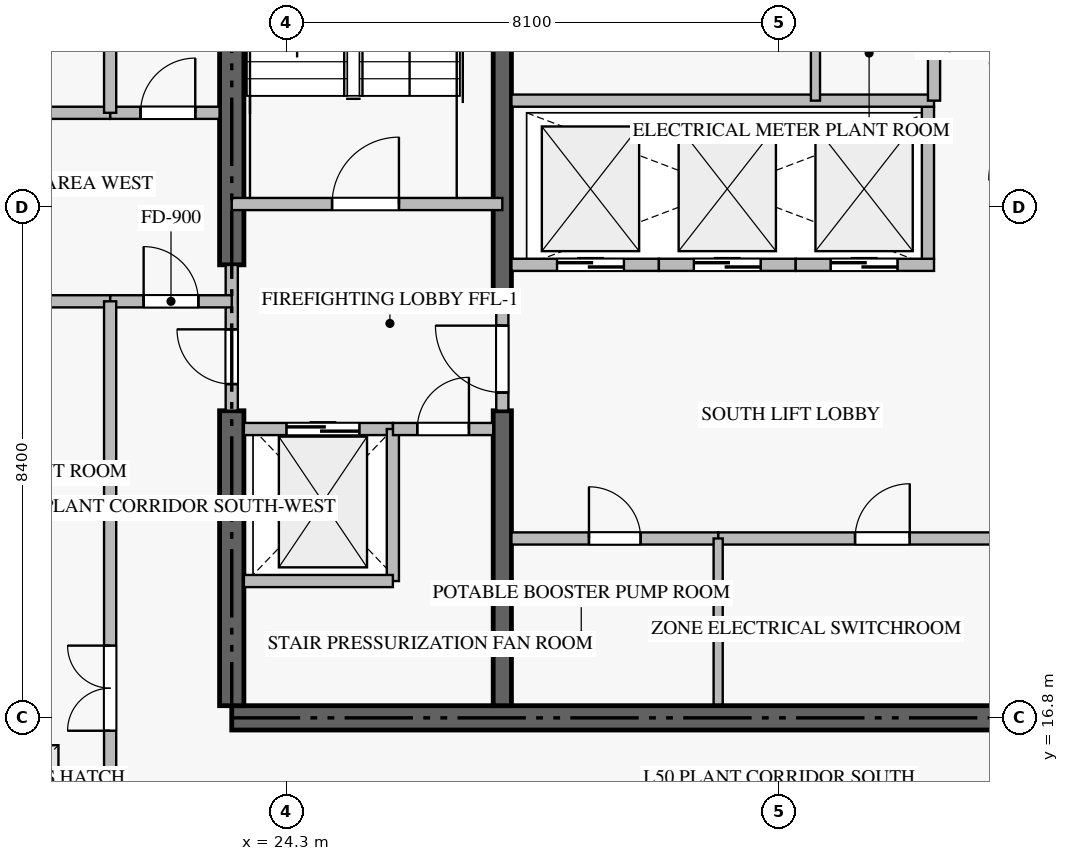
"""IFC4 building model, lengths in metres.
Left out: names, types, materials, properties, quantities, classifications, styles, units other than length and angle.
Written with IfcOpenShell. Run it as: python <this file> out.ifc"""

import sys

from ifc_helpers import new_model, si_unit, direction, frame, frame_2d, origin, origin_2d, place, context, subcontext, project, spatial, rectangle, extrude, source, transform, mapped, element, fill, save


model = new_model("IFC4")
c1 = context("Model", 3, precision=1e-05, world=origin(), true_north=direction((0.0, 1.0)))
c2 = subcontext(c1, "Body", "Model", "MODEL_VIEW")
j1 = project(units=[si_unit("LENGTHUNIT", "METRE"), si_unit("PLANEANGLEUNIT", "RADIAN")], contexts=[c1])
p1 = place(None, origin())
s1 = spatial("IfcSite", under=j1, at=p1, CompositionType="ELEMENT")
p2 = place(p1, origin())
s2 = spatial("IfcBuilding", under=s1, at=p2, CompositionType="ELEMENT")
p3 = place(p2, frame((0.0, 0.0, 198.9)))
s3 = spatial("IfcBuildingStorey", under=s2, at=p3, CompositionType="ELEMENT", Elevation=198.9)
p4 = place(p3, frame((23.4, 16.8, -0.44), z_axis=(0.0, 0.0, 1.0), x_axis=(1.0, 0.0, 0.0)))
e1 = element("IfcWall", 1, at=p4, inside=s3, PredefinedType="SHEAR", context=c2, shape_type="SweptSolid", body=[
    extrude(rectangle(XDim=18.0, YDim=0.4, at=frame_2d((9.0, 0.0))), origin(), (0.0, 0.0, 1.0), 6.078),
])
p5 = place(p3, frame((23.4, 17.0, -0.44), z_axis=(0.0, 0.0, 1.0), x_axis=(0.0, 1.0, 0.0)))
e2 = element("IfcWall", 2, at=p5, inside=s3, PredefinedType="SHEAR", context=c2, shape_type="SweptSolid", body=[
    extrude(rectangle(XDim=4.85, YDim=0.4, at=frame_2d((2.425, 0.0))), origin(), (0.0, 0.0, 1.0), 6.078),
])
p6 = place(p3, frame((23.4, 24.25, -0.44), z_axis=(0.0, 0.0, 1.0), x_axis=(0.0, 1.0, 0.0)))
e3 = element("IfcWall", 3, at=p6, inside=s3, PredefinedType="SHEAR", context=c2, shape_type="SweptSolid", body=[
    extrude(rectangle(XDim=9.15, YDim=0.4, at=frame_2d((4.575, 0.0))), origin(), (0.0, 0.0, 1.0), 6.078),
])
p7 = place(p3, frame((27.85, 17.0, -0.44), z_axis=(0.0, 0.0, 1.0), x_axis=(0.0, 1.0, 0.0)))
e4 = element("IfcWall", 4, at=p7, inside=s3, PredefinedType="SHEAR", context=c2, shape_type="SweptSolid", body=[
    extrude(rectangle(XDim=4.85, YDim=0.3, at=frame_2d((2.425, 0.0))), origin(), (0.0, 0.0, 1.0), 6.078),
])
p8 = place(p3, frame((27.85, 23.55, -0.44), z_axis=(0.0, 0.0, 1.0), x_axis=(0.0, 1.0, 0.0)))
e5 = element("IfcWall", 5, at=p8, inside=s3, PredefinedType="SHEAR", context=c2, shape_type="SweptSolid", body=[
    extrude(rectangle(XDim=9.85, YDim=0.3, at=frame_2d((4.925, 0.0))), origin(), (0.0, 0.0, 1.0), 6.078),
])
p9 = place(p3, frame((23.4, 25.25, 0.0), z_axis=(0.0, 0.0, 1.0), x_axis=(1.0, 0.0, 0.0)))
e6 = element("IfcWall", 6, at=p9, inside=s3, PredefinedType="STANDARD", context=c2, shape_type="SweptSolid", body=[
    extrude(rectangle(XDim=4.45, YDim=0.2, at=frame_2d((2.225, 0.0))), origin(), (0.0, 0.0, 1.0), 5.64),
])
p10 = place(p9, frame((1.65, 0.0, 0.0)))
e7 = element("IfcOpeningElement", 7, at=p10, cuts=e6, PredefinedType="OPENING", context=c2, shape_type="SweptSolid", body=[
    extrude(rectangle(XDim=1.1, YDim=2.15, at=frame_2d((0.55, 1.075))), frame((0.0, 0.11, 0.0), z_axis=(0.0, -1.0, 0.0), x_axis=(1.0, 0.0, 0.0)), (0.0, 0.0, 1.0), 0.22),
])
p11 = place(p3, frame((23.6, 21.55, 0.0), z_axis=(0.0, 0.0, 1.0), x_axis=(1.0, 0.0, 0.0)))
e8 = element("IfcWall", 8, at=p11, inside=s3, PredefinedType="STANDARD", context=c2, shape_type="SweptSolid", body=[
    extrude(rectangle(XDim=2.45, YDim=0.2, at=frame_2d((1.225, 0.0))), origin(), (0.0, 0.0, 1.0), 5.64),
])
p12 = place(p11, frame((0.7, 0.0, 0.0)))
e9 = element("IfcOpeningElement", 9, at=p12, cuts=e8, PredefinedType="OPENING", context=c2, shape_type="SweptSolid", body=[
    extrude(rectangle(XDim=1.2, YDim=2.2, at=frame_2d((0.6, 1.1))), frame((0.0, 0.11, 0.0), z_axis=(0.0, -1.0, 0.0), x_axis=(1.0, 0.0, 0.0)), (0.0, 0.0, 1.0), 0.22),
])
p13 = place(p3, frame((28.0, 24.25, 0.0), z_axis=(0.0, 0.0, 1.0), x_axis=(1.0, 0.0, 0.0)))
e10 = element("IfcWall", 10, at=p13, inside=s3, PredefinedType="STANDARD", context=c2, shape_type="SweptSolid", body=[
    extrude(rectangle(XDim=2.425, YDim=0.2, at=frame_2d((1.212, 0.0))), origin(), (0.0, 0.0, 1.0), 5.64),
])
p14 = place(p13, frame((0.75, 0.0, 0.0)))
e11 = element("IfcOpeningElement", 11, at=p14, cuts=e10, PredefinedType="OPENING", context=c2, shape_type="SweptSolid", body=[
    extrude(rectangle(XDim=1.1, YDim=2.2, at=frame_2d((0.55, 1.1))), frame((0.0, 0.11, 0.0), z_axis=(0.0, -1.0, 0.0), x_axis=(1.0, 0.0, 0.0)), (0.0, 0.0, 1.0), 0.22),
])
p15 = place(p3, frame((30.425, 24.25, 0.0), z_axis=(0.0, 0.0, 1.0), x_axis=(1.0, 0.0, 0.0)))
e12 = element("IfcWall", 12, at=p15, inside=s3, PredefinedType="STANDARD", context=c2, shape_type="SweptSolid", body=[
    extrude(rectangle(XDim=2.25, YDim=0.2, at=frame_2d((1.125, 0.0))), origin(), (0.0, 0.0, 1.0), 5.64),
])
p16 = place(p15, frame((0.575, 0.0, 0.0)))
e13 = element("IfcOpeningElement", 13, at=p16, cuts=e12, PredefinedType="OPENING", context=c2, shape_type="SweptSolid", body=[
    extrude(rectangle(XDim=1.1, YDim=2.2, at=frame_2d((0.55, 1.1))), frame((0.0, 0.11, 0.0), z_axis=(0.0, -1.0, 0.0), x_axis=(1.0, 0.0, 0.0)), (0.0, 0.0, 1.0), 0.22),
])
p17 = place(p3, frame((32.675, 24.25, 0.0), z_axis=(0.0, 0.0, 1.0), x_axis=(1.0, 0.0, 0.0)))
e14 = element("IfcWall", 14, at=p17, inside=s3, PredefinedType="STANDARD", context=c2, shape_type="SweptSolid", body=[
    extrude(rectangle(XDim=2.275, YDim=0.2, at=frame_2d((1.137, 0.0))), origin(), (0.0, 0.0, 1.0), 5.64),
])
p18 = place(p17, frame((0.575, 0.0, 0.0)))
e15 = element("IfcOpeningElement", 15, at=p18, cuts=e14, PredefinedType="OPENING", context=c2, shape_type="SweptSolid", body=[
    extrude(rectangle(XDim=1.1, YDim=2.2, at=frame_2d((0.55, 1.1))), frame((0.0, 0.11, 0.0), z_axis=(0.0, -1.0, 0.0), x_axis=(1.0, 0.0, 0.0)), (0.0, 0.0, 1.0), 0.22),
])
for number, where, z_axis, x_axis in (
    (16, (34.85, 24.35, 0.0), (0.0, 0.0, 1.0), (0.0, 1.0, 0.0)),
    (17, (26.05, 19.05, 0.0), (0.0, 0.0, 1.0), (0.0, 1.0, 0.0)),
):
    element("IfcWall", number, at=place(p3, frame(where, z_axis=z_axis, x_axis=x_axis)), inside=s3, PredefinedType="STANDARD", context=c2, shape_type="SweptSolid", body=[
        extrude(rectangle(XDim=2.5, YDim=0.2, at=frame_2d((1.25, 0.0))), origin(), (0.0, 0.0, 1.0), 5.64),
    ])
p19 = place(p3, frame((23.6, 19.05, 0.0), z_axis=(0.0, 0.0, 1.0), x_axis=(1.0, 0.0, 0.0)))
e18 = element("IfcWall", 18, at=p19, inside=s3, PredefinedType="STANDARD", context=c2, shape_type="SweptSolid", body=[
    extrude(rectangle(XDim=2.45, YDim=0.2, at=frame_2d((1.225, 0.0))), origin(), (0.0, 0.0, 1.0), 5.64),
])
p20 = place(p3, frame((26.052, 21.55, 0.0), z_axis=(0.0, 0.0, 1.0), x_axis=(1.0, 0.0, 0.0)))
e19 = element("IfcWall", 19, at=p20, inside=s3, PredefinedType="STANDARD", context=c2, shape_type="SweptSolid", body=[
    extrude(rectangle(XDim=1.648, YDim=0.2, at=frame_2d((0.824, 0.0))), origin(), (0.0, 0.0, 1.0), 5.64),
])
p21 = place(p20, frame((0.399, 0.0, 0.0)))
e20 = element("IfcOpeningElement", 20, at=p21, cuts=e19, PredefinedType="OPENING", context=c2, shape_type="SweptSolid", body=[
    extrude(rectangle(XDim=0.85, YDim=2.1, at=frame_2d((0.425, 1.05))), frame((0.0, 0.11, 0.0), z_axis=(0.0, -1.0, 0.0), x_axis=(1.0, 0.0, 0.0)), (0.0, 0.0, 1.0), 0.22),
])
p22 = place(p3, frame((23.4, 21.852, 0.0), z_axis=(0.0, 0.0, 1.0), x_axis=(0.0, 1.0, 0.0)))
e21 = element("IfcWall", 21, at=p22, inside=s3, PredefinedType="STANDARD", context=c2, shape_type="SweptSolid", body=[
    extrude(rectangle(XDim=2.396, YDim=0.2, at=frame_2d((1.198, 0.0))), origin(), (0.0, 0.0, 1.0), 5.64),
])
p23 = place(p22, frame((0.437, 0.0, 0.0)))
e22 = element("IfcOpeningElement", 22, at=p23, cuts=e21, PredefinedType="OPENING", context=c2, shape_type="SweptSolid", body=[
    extrude(rectangle(XDim=0.9, YDim=2.1, at=frame_2d((0.45, 1.05))), frame((0.0, 0.11, 0.0), z_axis=(0.0, -1.0, 0.0), x_axis=(1.0, 0.0, 0.0)), (0.0, 0.0, 1.0), 0.22),
])
p24 = place(p3, frame((27.85, 21.852, 0.0), z_axis=(0.0, 0.0, 1.0), x_axis=(0.0, 1.0, 0.0)))
e23 = element("IfcWall", 23, at=p24, inside=s3, PredefinedType="STANDARD", context=c2, shape_type="SweptSolid", body=[
    extrude(rectangle(XDim=1.696, YDim=0.2, at=frame_2d((0.848, 0.0))), origin(), (0.0, 0.0, 1.0), 5.64),
])
p25 = place(p24, frame((0.298, 0.0, 0.0)))
e24 = element("IfcOpeningElement", 24, at=p25, cuts=e23, PredefinedType="OPENING", context=c2, shape_type="SweptSolid", body=[
    extrude(rectangle(XDim=1.1, YDim=2.15, at=frame_2d((0.55, 1.075))), frame((0.0, 0.11, 0.0), z_axis=(0.0, -1.0, 0.0), x_axis=(1.0, 0.0, 0.0)), (0.0, 0.0, 1.0), 0.22),
])
p26 = place(p3, frame((28.0, 26.95, 0.0), z_axis=(0.0, 0.0, 1.0), x_axis=(1.0, 0.0, 0.0)))
e25 = element("IfcWall", 25, at=p26, inside=s3, PredefinedType="STANDARD", context=c2, shape_type="SweptSolid", body=[
    extrude(rectangle(XDim=6.95, YDim=0.2, at=frame_2d((3.475, 0.0))), origin(), (0.0, 0.0, 1.0), 5.64),
])
p27 = place(p3, frame((34.95, 26.95, 0.0), z_axis=(0.0, 0.0, 1.0), x_axis=(0.0, 1.0, 0.0)))
e26 = element("IfcWall", 26, at=p27, inside=s3, PredefinedType="STANDARD", context=c2, shape_type="SweptSolid", body=[
    extrude(rectangle(XDim=3.6, YDim=0.2, at=frame_2d((1.8, 0.0))), origin(), (0.0, 0.0, 1.0), 5.64),
])
p28 = place(p27, frame((1.35, 0.0, 0.0)))
e27 = element("IfcOpeningElement", 27, at=p28, cuts=e26, PredefinedType="OPENING", context=c2, shape_type="SweptSolid", body=[
    extrude(rectangle(XDim=0.9, YDim=2.1, at=frame_2d((0.45, 1.05))), frame((0.0, 0.11, 0.0), z_axis=(0.0, -1.0, 0.0), x_axis=(1.0, 0.0, 0.0)), (0.0, 0.0, 1.0), 0.22),
])
p29 = place(p3, frame((33.0, 26.95, 0.0), z_axis=(0.0, 0.0, 1.0), x_axis=(0.0, 1.0, 0.0)))
e28 = element("IfcWall", 28, at=p29, inside=s3, PredefinedType="PARTITIONING", context=c2, shape_type="SweptSolid", body=[
    extrude(rectangle(XDim=3.6, YDim=0.15, at=frame_2d((1.8, 0.0))), origin(), (0.0, 0.0, 1.0), 5.64),
])
p30 = place(p29, frame((1.375, 0.0, 0.0)))
e29 = element("IfcOpeningElement", 29, at=p30, cuts=e28, PredefinedType="OPENING", context=c2, shape_type="SweptSolid", body=[
    extrude(rectangle(XDim=0.85, YDim=2.1, at=frame_2d((0.425, 1.05))), frame((0.0, 0.085, 0.0), z_axis=(0.0, -1.0, 0.0), x_axis=(1.0, 0.0, 0.0)), (0.0, 0.0, 1.0), 0.17),
])
p31 = place(p3, frame((28.0, 19.75, 0.0), z_axis=(0.0, 0.0, 1.0), x_axis=(1.0, 0.0, 0.0)))
e30 = element("IfcWall", 30, at=p31, inside=s3, PredefinedType="STANDARD", context=c2, shape_type="SweptSolid", body=[
    extrude(rectangle(XDim=3.4, YDim=0.2, at=frame_2d((1.7, 0.0))), origin(), (0.0, 0.0, 1.0), 5.64),
])
p32 = place(p31, frame((1.275, 0.0, 0.0)))
e31 = element("IfcOpeningElement", 31, at=p32, cuts=e30, PredefinedType="OPENING", context=c2, shape_type="SweptSolid", body=[
    extrude(rectangle(XDim=0.85, YDim=2.1, at=frame_2d((0.425, 1.05))), frame((0.0, 0.11, 0.0), z_axis=(0.0, -1.0, 0.0), x_axis=(1.0, 0.0, 0.0)), (0.0, 0.0, 1.0), 0.22),
])
p33 = place(p3, frame((31.402, 19.75, 0.0), z_axis=(0.0, 0.0, 1.0), x_axis=(1.0, 0.0, 0.0)))
e32 = element("IfcWall", 32, at=p33, inside=s3, PredefinedType="STANDARD", context=c2, shape_type="SweptSolid", body=[
    extrude(rectangle(XDim=5.398, YDim=0.2, at=frame_2d((2.699, 0.0))), origin(), (0.0, 0.0, 1.0), 5.64),
])
p34 = place(p33, frame((2.249, 0.0, 0.0)))
e33 = element("IfcOpeningElement", 33, at=p34, cuts=e32, PredefinedType="OPENING", context=c2, shape_type="SweptSolid", body=[
    extrude(rectangle(XDim=0.9, YDim=2.1, at=frame_2d((0.45, 1.05))), frame((0.0, 0.11, 0.0), z_axis=(0.0, -1.0, 0.0), x_axis=(1.0, 0.0, 0.0)), (0.0, 0.0, 1.0), 0.22),
])
p35 = place(p3, frame((31.4, 17.02, 0.0), z_axis=(0.0, 0.0, 1.0), x_axis=(0.0, 1.0, 0.0)))
e34 = element("IfcWall", 34, at=p35, inside=s3, PredefinedType="PARTITIONING", context=c2, shape_type="SweptSolid", body=[
    extrude(rectangle(XDim=2.73, YDim=0.15, at=frame_2d((1.365, 0.0))), origin(), (0.0, 0.0, 1.0), 5.64),
])
p36 = place(p3, frame((15.2, 23.65, 0.0), z_axis=(0.0, 0.0, 1.0), x_axis=(1.0, 0.0, 0.0)))
e35 = element("IfcWall", 35, at=p36, inside=s3, PredefinedType="STANDARD", context=c2, shape_type="SweptSolid", body=[
    extrude(rectangle(XDim=6.2, YDim=0.2, at=frame_2d((3.1, 0.0))), origin(), (0.0, 0.0, 1.0), 5.64),
])
p37 = place(p3, frame((21.402, 23.65, 0.0), z_axis=(0.0, 0.0, 1.0), x_axis=(1.0, 0.0, 0.0)))
e36 = element("IfcWall", 36, at=p37, inside=s3, PredefinedType="STANDARD", context=c2, shape_type="SweptSolid", body=[
    extrude(rectangle(XDim=1.998, YDim=0.2, at=frame_2d((0.999, 0.0))), origin(), (0.0, 0.0, 1.0), 5.64),
])
p38 = place(p37, frame((0.549, 0.0, 0.0)))
e37 = element("IfcOpeningElement", 37, at=p38, cuts=e36, PredefinedType="OPENING", context=c2, shape_type="SweptSolid", body=[
    extrude(rectangle(XDim=0.9, YDim=2.1, at=frame_2d((0.45, 1.05))), frame((0.0, 0.11, 0.0), z_axis=(0.0, -1.0, 0.0), x_axis=(1.0, 0.0, 0.0)), (0.0, 0.0, 1.0), 0.22),
])
p39 = place(p3, frame((15.2, 26.75, 0.0), z_axis=(0.0, 0.0, 1.0), x_axis=(1.0, 0.0, 0.0)))
e38 = element("IfcWall", 38, at=p39, inside=s3, PredefinedType="STANDARD", context=c2, shape_type="SweptSolid", body=[
    extrude(rectangle(XDim=6.2, YDim=0.2, at=frame_2d((3.1, 0.0))), origin(), (0.0, 0.0, 1.0), 5.64),
])
p40 = place(p3, frame((21.402, 26.75, 0.0), z_axis=(0.0, 0.0, 1.0), x_axis=(1.0, 0.0, 0.0)))
e39 = element("IfcWall", 39, at=p40, inside=s3, PredefinedType="STANDARD", context=c2, shape_type="SweptSolid", body=[
    extrude(rectangle(XDim=1.798, YDim=0.2, at=frame_2d((0.899, 0.0))), origin(), (0.0, 0.0, 1.0), 5.64),
])
p41 = place(p40, frame((0.498, 0.0, 0.0)))
e40 = element("IfcOpeningElement", 40, at=p41, cuts=e39, PredefinedType="OPENING", context=c2, shape_type="SweptSolid", body=[
    extrude(rectangle(XDim=0.9, YDim=2.1, at=frame_2d((0.45, 1.05))), frame((0.0, 0.11, 0.0), z_axis=(0.0, -1.0, 0.0), x_axis=(1.0, 0.0, 0.0)), (0.0, 0.0, 1.0), 0.22),
])
p42 = place(p3, frame((21.4, 14.8, 0.0), z_axis=(0.0, 0.0, 1.0), x_axis=(0.0, 1.0, 0.0)))
e41 = element("IfcWall", 41, at=p42, inside=s3, PredefinedType="STANDARD", context=c2, shape_type="SweptSolid", body=[
    extrude(rectangle(XDim=8.85, YDim=0.2, at=frame_2d((4.425, 0.0))), origin(), (0.0, 0.0, 1.0), 5.64),
])
p43 = place(p42, frame((1.788, 0.0, 0.0)))
e42 = element("IfcOpeningElement", 42, at=p43, cuts=e41, PredefinedType="OPENING", context=c2, shape_type="SweptSolid", body=[
    extrude(rectangle(XDim=1.4, YDim=2.2, at=frame_2d((0.7, 1.1))), frame((0.0, 0.11, 0.0), z_axis=(0.0, -1.0, 0.0), x_axis=(1.0, 0.0, 0.0)), (0.0, 0.0, 1.0), 0.22),
])
p44 = place(p3, frame((21.4, 26.75, 0.0), z_axis=(0.0, 0.0, 1.0), x_axis=(0.0, 1.0, 0.0)))
e43 = element("IfcWall", 43, at=p44, inside=s3, PredefinedType="STANDARD", context=c2, shape_type="SweptSolid", body=[
    extrude(rectangle(XDim=8.85, YDim=0.2, at=frame_2d((4.425, 0.0))), origin(), (0.0, 0.0, 1.0), 5.64),
])
p45 = place(p44, frame((5.662, 0.0, 0.0)))
e44 = element("IfcOpeningElement", 44, at=p45, cuts=e43, PredefinedType="OPENING", context=c2, shape_type="SweptSolid", body=[
    extrude(rectangle(XDim=1.4, YDim=2.2, at=frame_2d((0.7, 1.1))), frame((0.0, 0.11, 0.0), z_axis=(0.0, -1.0, 0.0), x_axis=(1.0, 0.0, 0.0)), (0.0, 0.0, 1.0), 0.22),
])
p46 = place(p2, frame((0.0, 0.0, 204.9)))
p47 = place(p46, frame((0.0, 0.0, -0.36)))
p48 = place(p47, frame((20.0, 15.8, 0.0)))
p49 = place(p48, frame((0.0, 0.0, 0.32)))
e45 = element("IfcDoor", 45, at=p49, inside=s3, OperationType="SINGLE_SWING_LEFT", PredefinedType="TRAPDOOR", context=c2, shape_type="SweptSolid", body=[
    extrude(rectangle(XDim=1.1, YDim=1.1, at=origin_2d()), origin(), (0.0, 0.0, 1.0), 0.04),
])
m1 = source(origin(), c2, "Body", "SweptSolid", [
    extrude(rectangle(XDim=1.1, YDim=2.15, at=frame_2d((0.55, 1.075))), frame((0.0, 0.025, 0.0), z_axis=(0.0, -1.0, 0.0), x_axis=(1.0, 0.0, 0.0)), (0.0, 0.0, 1.0), 0.05),
])
p50 = place(p10, origin())
e46 = element("IfcDoor", 46, at=p50, inside=s3, OperationType="SINGLE_SWING_RIGHT", PredefinedType="DOOR", context=c2, shape_type="MappedRepresentation", body=[
    mapped(m1, transform((0.0, 0.0, 0.0), scale=1.0)),
])
fill(e7, e46)
m2 = source(origin(), c2, "Body", "SweptSolid", [
    extrude(rectangle(XDim=1.2, YDim=2.2, at=frame_2d((0.6, 1.1))), frame((0.0, 0.025, 0.0), z_axis=(0.0, -1.0, 0.0), x_axis=(1.0, 0.0, 0.0)), (0.0, 0.0, 1.0), 0.05),
])
p51 = place(p12, origin())
e47 = element("IfcDoor", 47, at=p51, inside=s3, OperationType="DOUBLE_DOOR_SLIDING", PredefinedType="DOOR", context=c2, shape_type="MappedRepresentation", body=[
    mapped(m2, transform((0.0, 0.0, 0.0), scale=1.0)),
])
fill(e9, e47)
m3 = source(origin(), c2, "Body", "SweptSolid", [
    extrude(rectangle(XDim=1.1, YDim=2.2, at=frame_2d((0.55, 1.1))), frame((0.0, 0.025, 0.0), z_axis=(0.0, -1.0, 0.0), x_axis=(1.0, 0.0, 0.0)), (0.0, 0.0, 1.0), 0.05),
])
p52 = place(p14, origin())
e48 = element("IfcDoor", 48, at=p52, inside=s3, OperationType="DOUBLE_DOOR_SLIDING", PredefinedType="DOOR", context=c2, shape_type="MappedRepresentation", body=[
    mapped(m3, transform((0.0, 0.0, 0.0), scale=1.0)),
])
fill(e11, e48)
p53 = place(p16, origin())
e49 = element("IfcDoor", 49, at=p53, inside=s3, OperationType="DOUBLE_DOOR_SLIDING", PredefinedType="DOOR", context=c2, shape_type="MappedRepresentation", body=[
    mapped(m3, transform((0.0, 0.0, 0.0), scale=1.0)),
])
fill(e13, e49)
p54 = place(p18, origin())
e50 = element("IfcDoor", 50, at=p54, inside=s3, OperationType="DOUBLE_DOOR_SLIDING", PredefinedType="DOOR", context=c2, shape_type="MappedRepresentation", body=[
    mapped(m3, transform((0.0, 0.0, 0.0), scale=1.0)),
])
fill(e15, e50)
m4 = source(origin(), c2, "Body", "SweptSolid", [
    extrude(rectangle(XDim=0.85, YDim=2.1, at=frame_2d((0.425, 1.05))), frame((0.0, 0.025, 0.0), z_axis=(0.0, -1.0, 0.0), x_axis=(1.0, 0.0, 0.0)), (0.0, 0.0, 1.0), 0.05),
])
p55 = place(p21, origin())
e51 = element("IfcDoor", 51, at=p55, inside=s3, OperationType="SINGLE_SWING_RIGHT", PredefinedType="DOOR", context=c2, shape_type="MappedRepresentation", body=[
    mapped(m4, transform((0.0, 0.0, 0.0), scale=1.0)),
])
fill(e20, e51)
m5 = source(origin(), c2, "Body", "SweptSolid", [
    extrude(rectangle(XDim=0.9, YDim=2.1, at=frame_2d((0.45, 1.05))), frame((0.0, 0.025, 0.0), z_axis=(0.0, -1.0, 0.0), x_axis=(1.0, 0.0, 0.0)), (0.0, 0.0, 1.0), 0.05),
])
p56 = place(p23, origin())
e52 = element("IfcDoor", 52, at=p56, inside=s3, OperationType="SINGLE_SWING_RIGHT", PredefinedType="DOOR", context=c2, shape_type="MappedRepresentation", body=[
    mapped(m5, transform((0.0, 0.0, 0.0), scale=1.0)),
])
fill(e22, e52)
p57 = place(p25, origin())
e53 = element("IfcDoor", 53, at=p57, inside=s3, OperationType="SINGLE_SWING_RIGHT", PredefinedType="DOOR", context=c2, shape_type="MappedRepresentation", body=[
    mapped(m1, transform((0.0, 0.0, 0.0), scale=1.0)),
])
fill(e24, e53)
p58 = place(p32, origin())
e54 = element("IfcDoor", 54, at=p58, inside=s3, OperationType="SINGLE_SWING_LEFT", PredefinedType="DOOR", context=c2, shape_type="MappedRepresentation", body=[
    mapped(m4, transform((0.0, 0.0, 0.0), scale=1.0)),
])
fill(e31, e54)
p59 = place(p34, origin())
e55 = element("IfcDoor", 55, at=p59, inside=s3, OperationType="SINGLE_SWING_RIGHT", PredefinedType="DOOR", context=c2, shape_type="MappedRepresentation", body=[
    mapped(m5, transform((0.0, 0.0, 0.0), scale=1.0)),
])
fill(e33, e55)
p60 = place(p38, origin())
e56 = element("IfcDoor", 56, at=p60, inside=s3, OperationType="SINGLE_SWING_LEFT", PredefinedType="DOOR", context=c2, shape_type="MappedRepresentation", body=[
    mapped(m5, transform((0.0, 0.0, 0.0), scale=1.0)),
])
fill(e37, e56)
p61 = place(p41, origin())
e57 = element("IfcDoor", 57, at=p61, inside=s3, OperationType="SINGLE_SWING_RIGHT", PredefinedType="DOOR", context=c2, shape_type="MappedRepresentation", body=[
    mapped(m5, transform((0.0, 0.0, 0.0), scale=1.0)),
])
fill(e40, e57)
m6 = source(origin(), c2, "Body", "SweptSolid", [
    extrude(rectangle(XDim=1.4, YDim=2.2, at=frame_2d((0.7, 1.1))), frame((0.0, 0.025, 0.0), z_axis=(0.0, -1.0, 0.0), x_axis=(1.0, 0.0, 0.0)), (0.0, 0.0, 1.0), 0.05),
])
p62 = place(p43, origin())
e58 = element("IfcDoor", 58, at=p62, inside=s3, OperationType="DOUBLE_DOOR_SINGLE_SWING", PredefinedType="DOOR", context=c2, shape_type="MappedRepresentation", body=[
    mapped(m6, transform((0.0, 0.0, 0.0), scale=1.0)),
])
fill(e42, e58)
save(model, sys.argv[1])
